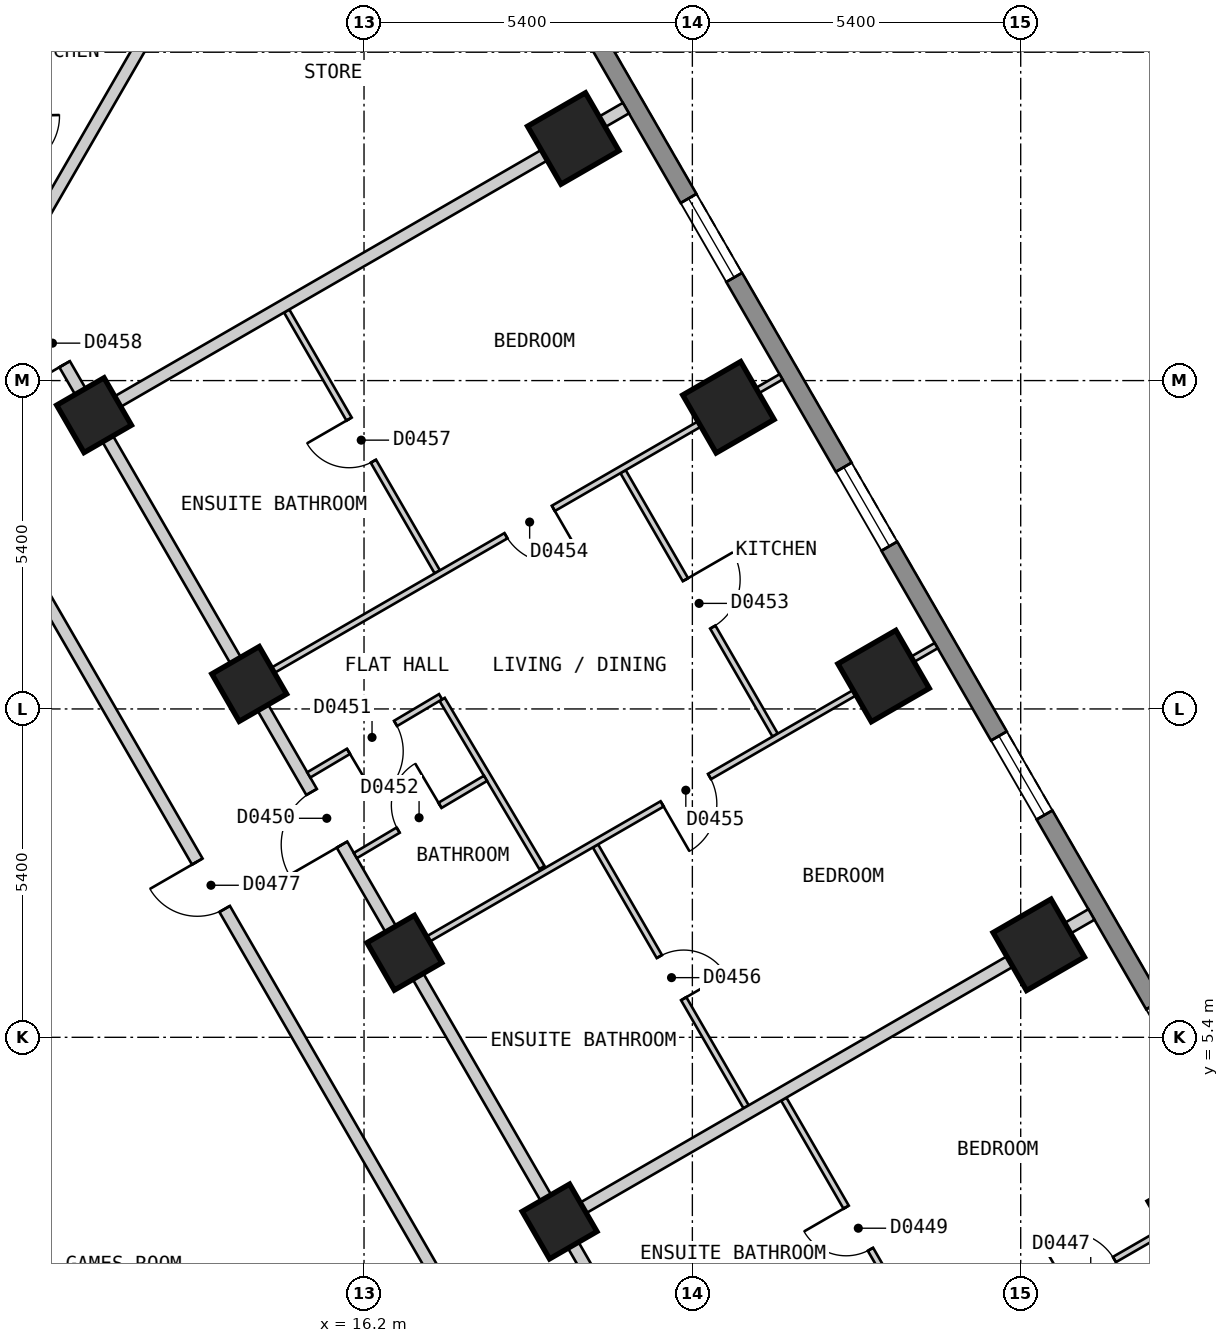
"""IFC4 building model, lengths in metres.
Left out: names, types, materials, properties, quantities, classifications, styles, units other than length and angle.
Written with IfcOpenShell. Run it as: python <this file> out.ifc"""

import sys

from ifc_helpers import new_model, si_unit, direction, frame, frame_2d, origin, origin_2d, place, context, subcontext, project, spatial, polyline, rectangle, outline, extrude, element, fill, save


model = new_model("IFC4")
c1 = context("Model", 3, precision=1e-05, world=origin(), true_north=direction((0.0, 1.0)))
c2 = subcontext(c1, "Body", "Model", "MODEL_VIEW")
j1 = project(units=[si_unit("LENGTHUNIT", "METRE"), si_unit("PLANEANGLEUNIT", "RADIAN")], contexts=[c1])
p1 = place(None, origin())
s1 = spatial("IfcSite", under=j1, at=p1, CompositionType="ELEMENT")
p2 = place(p1, origin())
s2 = spatial("IfcBuilding", under=s1, at=p2, CompositionType="ELEMENT")
p3 = place(p2, frame((0.0, 0.0, 26.4)))
s3 = spatial("IfcBuildingStorey", under=s2, at=p3, CompositionType="ELEMENT", Elevation=26.4)
for number, where, z_axis, x_axis in (
    (1, (29.848, 2.5, 0.0), (0.0, 0.0, 1.0), (-0.5, 0.866, 0.0)),
    (2, (27.297, 6.921, 0.0), (0.0, 0.0, 1.0), (-0.5, 0.866, 0.0)),
    (3, (24.745, 11.341, 0.0), (0.0, 0.0, 1.0), (-0.5, 0.866, 0.0)),
    (4, (22.193, 15.761, 0.0), (0.0, 0.0, 1.0), (-0.5, 0.866, 0.0)),
    (5, (19.641, 20.181, 0.0), (0.0, 0.0, 1.0), (-0.5, 0.866, 0.0)),
):
    element("IfcColumn", number, at=place(p3, frame(where, z_axis=z_axis, x_axis=x_axis)), inside=s3, PredefinedType="COLUMN", context=c2, shape_type="SweptSolid", body=[
        extrude(rectangle(XDim=1.1, YDim=1.1, at=origin_2d()), origin(), (0.0, 0.0, 1.0), 3.0),
    ])
for number, where, z_axis, x_axis in (
    (6, (19.416, 2.371, 0.0), (0.0, 0.0, 1.0), (-0.5, 0.866, 0.0)),
    (7, (16.864, 6.791, 0.0), (0.0, 0.0, 1.0), (-0.5, 0.866, 0.0)),
    (8, (14.312, 11.211, 0.0), (0.0, 0.0, 1.0), (-0.5, 0.866, 0.0)),
    (9, (11.76, 15.631, 0.0), (0.0, 0.0, 1.0), (-0.5, 0.866, 0.0)),
):
    element("IfcColumn", number, at=place(p3, frame(where, z_axis=z_axis, x_axis=x_axis)), inside=s3, PredefinedType="COLUMN", context=c2, shape_type="SweptSolid", body=[
        extrude(rectangle(XDim=0.9, YDim=0.9, at=origin_2d()), origin(), (0.0, 0.0, 1.0), 3.0),
    ])
p4 = place(p3, frame((31.22, 2.425, 0.0), z_axis=(0.0, 0.0, 1.0), x_axis=(-0.500001938803, 0.866024284413, 0.0)))
e10 = element("IfcWall", 10, at=p4, inside=s3, PredefinedType="SOLIDWALL", context=c2, shape_type="SweptSolid", body=[
    extrude(outline(polyline([(0.0, -0.15), (27.02, -0.15), (26.94, 0.15), (0.08, 0.15), (0.0, -0.15)])), origin(), (0.0, 0.0, 1.0), 2.7),
])
p5 = place(p4, frame((2.553, 0.0, 0.15)))
e11 = element("IfcOpeningElement", 11, at=p5, cuts=e10, PredefinedType="OPENING", context=c2, shape_type="SweptSolid", body=[
    extrude(rectangle(XDim=1.5, YDim=2.1, at=frame_2d((0.75, 1.05))), frame((0.0, 0.16, 0.0), z_axis=(0.0, -1.0, 0.0), x_axis=(1.0, 0.0, 0.0)), (0.0, 0.0, 1.0), 0.32),
])
p6 = place(p4, frame((7.657, 0.0, 0.15)))
e12 = element("IfcOpeningElement", 12, at=p6, cuts=e10, PredefinedType="OPENING", context=c2, shape_type="SweptSolid", body=[
    extrude(rectangle(XDim=1.5, YDim=2.1, at=frame_2d((0.75, 1.05))), frame((0.0, 0.16, 0.0), z_axis=(0.0, -1.0, 0.0), x_axis=(1.0, 0.0, 0.0)), (0.0, 0.0, 1.0), 0.32),
])
p7 = place(p4, frame((12.761, 0.0, 0.15)))
e13 = element("IfcOpeningElement", 13, at=p7, cuts=e10, PredefinedType="OPENING", context=c2, shape_type="SweptSolid", body=[
    extrude(rectangle(XDim=1.5, YDim=2.1, at=frame_2d((0.75, 1.05))), frame((0.0, 0.16, 0.0), z_axis=(0.0, -1.0, 0.0), x_axis=(1.0, 0.0, 0.0)), (0.0, 0.0, 1.0), 0.32),
])
p8 = place(p4, frame((17.865, 0.0, 0.15)))
e14 = element("IfcOpeningElement", 14, at=p8, cuts=e10, PredefinedType="OPENING", context=c2, shape_type="SweptSolid", body=[
    extrude(rectangle(XDim=1.5, YDim=2.1, at=frame_2d((0.75, 1.05))), frame((0.0, 0.16, 0.0), z_axis=(0.0, -1.0, 0.0), x_axis=(1.0, 0.0, 0.0)), (0.0, 0.0, 1.0), 0.32),
])
p9 = place(p4, frame((22.969, 0.0, 0.15)))
e15 = element("IfcOpeningElement", 15, at=p9, cuts=e10, PredefinedType="OPENING", context=c2, shape_type="SweptSolid", body=[
    extrude(rectangle(XDim=1.5, YDim=2.1, at=frame_2d((0.75, 1.05))), frame((0.0, 0.16, 0.0), z_axis=(0.0, -1.0, 0.0), x_axis=(1.0, 0.0, 0.0)), (0.0, 0.0, 1.0), 0.32),
])
p10 = place(p3, frame((9.18, 15.7, 0.0), z_axis=(0.0, 0.0, 1.0), x_axis=(0.500003652032, -0.866023295272, 0.0)))
e16 = element("IfcWall", 16, at=p10, inside=s3, PredefinedType="PARTITIONING", context=c2, shape_type="SweptSolid", body=[
    extrude(rectangle(XDim=18.012, YDim=0.2, at=frame_2d((9.006, 0.0))), origin(), (0.0, 0.0, 1.0), 2.7),
])
p11 = place(p10, frame((8.556, 0.0, 0.0)))
e17 = element("IfcOpeningElement", 17, at=p11, cuts=e16, PredefinedType="OPENING", context=c2, shape_type="SweptSolid", body=[
    extrude(rectangle(XDim=0.9, YDim=2.1, at=frame_2d((0.45, 1.05))), frame((0.0, 0.11, 0.0), z_axis=(0.0, -1.0, 0.0), x_axis=(1.0, 0.0, 0.0)), (0.0, 0.0, 1.0), 0.22),
])
p12 = place(p3, frame((10.45, 17.9, 0.0), z_axis=(0.0, 0.0, 1.0), x_axis=(0.500034352617, -0.866005569383, 0.0)))
e18 = element("IfcWall", 18, at=p12, inside=s3, PredefinedType="PARTITIONING", context=c2, shape_type="SweptSolid", body=[
    extrude(rectangle(XDim=20.553, YDim=0.2, at=frame_2d((10.276, 0.0))), origin(), (0.0, 0.0, 1.0), 2.7),
])
p13 = place(p12, frame((9.775, 0.0, 0.0)))
e19 = element("IfcOpeningElement", 19, at=p13, cuts=e18, PredefinedType="OPENING", context=c2, shape_type="SweptSolid", body=[
    extrude(rectangle(XDim=1.0, YDim=2.1, at=frame_2d((0.5, 1.05))), frame((0.0, 0.11, 0.0), z_axis=(0.0, -1.0, 0.0), x_axis=(1.0, 0.0, 0.0)), (0.0, 0.0, 1.0), 0.22),
])
p14 = place(p12, frame((0.852, 0.0, 0.0)))
e20 = element("IfcOpeningElement", 20, at=p14, cuts=e18, PredefinedType="OPENING", context=c2, shape_type="SweptSolid", body=[
    extrude(rectangle(XDim=0.8, YDim=2.1, at=frame_2d((0.4, 1.05))), frame((0.0, 0.11, 0.0), z_axis=(0.0, -1.0, 0.0), x_axis=(1.0, 0.0, 0.0)), (0.0, 0.0, 1.0), 0.22),
])
p15 = place(p3, frame((17.485, 10.957, 0.0), z_axis=(0.0, 0.0, 1.0), x_axis=(0.510324709283, -0.859981796956, 0.0)))
e21 = element("IfcWall", 21, at=p15, inside=s3, PredefinedType="PARTITIONING", context=c2, shape_type="SweptSolid", body=[
    extrude(rectangle(XDim=3.215, YDim=0.1, at=frame_2d((1.608, 0.0))), origin(), (0.0, 0.0, 1.0), 2.7),
])
p16 = place(p3, frame((14.928, 17.344, 0.0), z_axis=(0.0, 0.0, 1.0), x_axis=(0.500029609304, -0.86600830817, 0.0)))
e22 = element("IfcWall", 22, at=p16, inside=s3, PredefinedType="PARTITIONING", context=c2, shape_type="SweptSolid", body=[
    extrude(rectangle(XDim=4.954, YDim=0.1, at=frame_2d((2.477, 0.0))), origin(), (0.0, 0.0, 1.0), 2.7),
])
p17 = place(p16, frame((2.052, 0.0, 0.0)))
e23 = element("IfcOpeningElement", 23, at=p17, cuts=e22, PredefinedType="OPENING", context=c2, shape_type="SweptSolid", body=[
    extrude(rectangle(XDim=0.8, YDim=2.1, at=frame_2d((0.4, 1.05))), frame((0.0, 0.06, 0.0), z_axis=(0.0, -1.0, 0.0), x_axis=(1.0, 0.0, 0.0)), (0.0, 0.0, 1.0), 0.12),
])
p18 = place(p3, frame((20.006, 8.548, 0.0), z_axis=(0.0, 0.0, 1.0), x_axis=(0.500055121407, -0.865993577086, 0.0)))
e24 = element("IfcWall", 24, at=p18, inside=s3, PredefinedType="PARTITIONING", context=c2, shape_type="SweptSolid", body=[
    extrude(rectangle(XDim=4.955, YDim=0.1, at=frame_2d((2.478, 0.0))), origin(), (0.0, 0.0, 1.0), 2.7),
])
p19 = place(p18, frame((2.102, 0.0, 0.0)))
e25 = element("IfcOpeningElement", 25, at=p19, cuts=e24, PredefinedType="OPENING", context=c2, shape_type="SweptSolid", body=[
    extrude(rectangle(XDim=0.8, YDim=2.1, at=frame_2d((0.4, 1.05))), frame((0.0, 0.06, 0.0), z_axis=(0.0, -1.0, 0.0), x_axis=(1.0, 0.0, 0.0)), (0.0, 0.0, 1.0), 0.12),
])
p20 = place(p3, frame((23.103, 4.384, 0.0), z_axis=(0.0, 0.0, 1.0), x_axis=(0.500029609304, -0.86600830817, 0.0)))
e26 = element("IfcWall", 26, at=p20, inside=s3, PredefinedType="PARTITIONING", context=c2, shape_type="SweptSolid", body=[
    extrude(rectangle(XDim=4.954, YDim=0.1, at=frame_2d((2.477, 0.0))), origin(), (0.0, 0.0, 1.0), 2.7),
])
p21 = place(p20, frame((2.052, 0.0, 0.0)))
e27 = element("IfcOpeningElement", 27, at=p21, cuts=e26, PredefinedType="OPENING", context=c2, shape_type="SweptSolid", body=[
    extrude(rectangle(XDim=0.8, YDim=2.1, at=frame_2d((0.4, 1.05))), frame((0.0, 0.06, 0.0), z_axis=(0.0, -1.0, 0.0), x_axis=(1.0, 0.0, 0.0)), (0.0, 0.0, 1.0), 0.12),
])
p22 = place(p3, frame((20.46, 14.703, 0.0), z_axis=(0.0, 0.0, 1.0), x_axis=(0.499918186652, -0.866072633591, 0.0)))
e28 = element("IfcWall", 28, at=p22, inside=s3, PredefinedType="PARTITIONING", context=c2, shape_type="SweptSolid", body=[
    extrude(rectangle(XDim=5.003, YDim=0.1, at=frame_2d((2.501, 0.0))), origin(), (0.0, 0.0, 1.0), 2.7),
])
p23 = place(p22, frame((2.052, 0.0, 0.0)))
e29 = element("IfcOpeningElement", 29, at=p23, cuts=e28, PredefinedType="OPENING", context=c2, shape_type="SweptSolid", body=[
    extrude(rectangle(XDim=0.9, YDim=2.1, at=frame_2d((0.45, 1.05))), frame((0.0, 0.06, 0.0), z_axis=(0.0, -1.0, 0.0), x_axis=(1.0, 0.0, 0.0)), (0.0, 0.0, 1.0), 0.12),
])
p24 = place(p3, frame((25.588, 0.041, 0.0), z_axis=(0.0, 0.0, 1.0), x_axis=(0.866113484451, 0.499847408768, 0.0)))
e30 = element("IfcWall", 30, at=p24, inside=s3, PredefinedType="PARTITIONING", context=c2, shape_type="SweptSolid", body=[
    extrude(rectangle(XDim=5.92, YDim=0.1, at=frame_2d((2.96, 0.0))), origin(), (0.0, 0.0, 1.0), 2.7),
])
p25 = place(p24, frame((2.51, 0.0, 0.0)))
e31 = element("IfcOpeningElement", 31, at=p25, cuts=e30, PredefinedType="OPENING", context=c2, shape_type="SweptSolid", body=[
    extrude(rectangle(XDim=0.9, YDim=2.1, at=frame_2d((0.45, 1.05))), frame((0.0, 0.06, 0.0), z_axis=(0.0, -1.0, 0.0), x_axis=(1.0, 0.0, 0.0)), (0.0, 0.0, 1.0), 0.12),
])
p26 = place(p3, frame((16.95, 6.841, 0.0), z_axis=(0.0, 0.0, 1.0), x_axis=(0.866022959057, 0.500004234368, 0.0)))
e32 = element("IfcWall", 32, at=p26, inside=s3, PredefinedType="PARTITIONING", context=c2, shape_type="SweptSolid", body=[
    extrude(rectangle(XDim=10.0, YDim=0.1, at=frame_2d((5.0, 0.0))), origin(), (0.0, 0.0, 1.0), 2.7),
])
p27 = place(p26, frame((4.795, 0.0, 0.0)))
e33 = element("IfcOpeningElement", 33, at=p27, cuts=e32, PredefinedType="OPENING", context=c2, shape_type="SweptSolid", body=[
    extrude(rectangle(XDim=0.9, YDim=2.1, at=frame_2d((0.45, 1.05))), frame((0.0, 0.06, 0.0), z_axis=(0.0, -1.0, 0.0), x_axis=(1.0, 0.0, 0.0)), (0.0, 0.0, 1.0), 0.12),
])
p28 = place(p3, frame((14.399, 11.261, 0.0), z_axis=(0.0, 0.0, 1.0), x_axis=(0.866022959057, 0.500004234368, 0.0)))
e34 = element("IfcWall", 34, at=p28, inside=s3, PredefinedType="PARTITIONING", context=c2, shape_type="SweptSolid", body=[
    extrude(rectangle(XDim=10.0, YDim=0.1, at=frame_2d((5.0, 0.0))), origin(), (0.0, 0.0, 1.0), 2.7),
])
p29 = place(p28, frame((4.775, 0.0, 0.0)))
e35 = element("IfcOpeningElement", 35, at=p29, cuts=e34, PredefinedType="OPENING", context=c2, shape_type="SweptSolid", body=[
    extrude(rectangle(XDim=0.9, YDim=2.1, at=frame_2d((0.45, 1.05))), frame((0.0, 0.06, 0.0), z_axis=(0.0, -1.0, 0.0), x_axis=(1.0, 0.0, 0.0)), (0.0, 0.0, 1.0), 0.12),
])
p30 = place(p3, frame((16.057, 8.389, 0.0), z_axis=(0.0, 0.0, 1.0), x_axis=(0.860077993161, 0.510162567893, 0.0)))
e36 = element("IfcWall", 36, at=p30, inside=s3, PredefinedType="PARTITIONING", context=c2, shape_type="SweptSolid", body=[
    extrude(rectangle(XDim=2.49, YDim=0.1, at=frame_2d((1.245, 0.0))), origin(), (0.0, 0.0, 1.0), 2.7),
])
p31 = place(p30, frame((0.819, 0.0, 0.0)))
e37 = element("IfcOpeningElement", 37, at=p31, cuts=e36, PredefinedType="OPENING", context=c2, shape_type="SweptSolid", body=[
    extrude(rectangle(XDim=0.8, YDim=2.1, at=frame_2d((0.4, 1.05))), frame((0.0, 0.06, 0.0), z_axis=(0.0, -1.0, 0.0), x_axis=(1.0, 0.0, 0.0)), (0.0, 0.0, 1.0), 0.12),
])
p32 = place(p3, frame((15.291, 9.715, 0.0), z_axis=(0.0, 0.0, 1.0), x_axis=(0.860088508644, 0.51014483953, 0.0)))
e38 = element("IfcWall", 38, at=p32, inside=s3, PredefinedType="PARTITIONING", context=c2, shape_type="SweptSolid", body=[
    extrude(rectangle(XDim=2.521, YDim=0.1, at=frame_2d((1.26, 0.0))), origin(), (0.0, 0.0, 1.0), 2.7),
])
p33 = place(p32, frame((0.76, 0.0, 0.0)))
e39 = element("IfcOpeningElement", 39, at=p33, cuts=e38, PredefinedType="OPENING", context=c2, shape_type="SweptSolid", body=[
    extrude(rectangle(XDim=0.9, YDim=2.1, at=frame_2d((0.45, 1.05))), frame((0.0, 0.06, 0.0), z_axis=(0.0, -1.0, 0.0), x_axis=(1.0, 0.0, 0.0)), (0.0, 0.0, 1.0), 0.12),
])
p34 = place(p3, frame((10.393, 18.0, 0.0), z_axis=(0.0, 0.0, 1.0), x_axis=(0.499945497007, 0.866056868816, 0.0)))
e40 = element("IfcWall", 40, at=p34, inside=s3, PredefinedType="PARTITIONING", context=c2, shape_type="SweptSolid", body=[
    extrude(rectangle(XDim=10.265, YDim=0.2, at=frame_2d((5.132, 0.0))), origin(), (0.0, 0.0, 1.0), 2.7),
])
p35 = place(p3, frame((19.503, 2.421, 0.0), z_axis=(0.0, 0.0, 1.0), x_axis=(0.866065245018, 0.499930986609, 0.0)))
e41 = element("IfcWall", 41, at=p35, inside=s3, PredefinedType="PARTITIONING", context=c2, shape_type="SweptSolid", body=[
    extrude(rectangle(XDim=10.0, YDim=0.2, at=frame_2d((5.0, 0.0))), origin(), (0.0, 0.0, 1.0), 2.7),
])
p36 = place(p3, frame((11.847, 15.681, 0.0), z_axis=(0.0, 0.0, 1.0), x_axis=(0.866022959057, 0.500004234368, 0.0)))
e42 = element("IfcWall", 42, at=p36, inside=s3, PredefinedType="PARTITIONING", context=c2, shape_type="SweptSolid", body=[
    extrude(rectangle(XDim=10.0, YDim=0.2, at=frame_2d((5.0, 0.0))), origin(), (0.0, 0.0, 1.0), 2.7),
])
p37 = place(p6, origin())
e43 = element("IfcWindow", 43, at=p37, inside=s3, PartitioningType="SINGLE_PANEL", PredefinedType="WINDOW", context=c2, shape_type="SweptSolid", body=[
    extrude(rectangle(XDim=1.5, YDim=2.1, at=frame_2d((0.75, 1.05))), frame((0.0, 0.03, 0.0), z_axis=(0.0, -1.0, 0.0), x_axis=(1.0, 0.0, 0.0)), (0.0, 0.0, 1.0), 0.06),
])
fill(e12, e43)
p38 = place(p7, origin())
e44 = element("IfcWindow", 44, at=p38, inside=s3, PartitioningType="SINGLE_PANEL", PredefinedType="WINDOW", context=c2, shape_type="SweptSolid", body=[
    extrude(rectangle(XDim=1.5, YDim=2.1, at=frame_2d((0.75, 1.05))), frame((0.0, 0.03, 0.0), z_axis=(0.0, -1.0, 0.0), x_axis=(1.0, 0.0, 0.0)), (0.0, 0.0, 1.0), 0.06),
])
fill(e13, e44)
p39 = place(p8, origin())
e45 = element("IfcWindow", 45, at=p39, inside=s3, PartitioningType="SINGLE_PANEL", PredefinedType="WINDOW", context=c2, shape_type="SweptSolid", body=[
    extrude(rectangle(XDim=1.5, YDim=2.1, at=frame_2d((0.75, 1.05))), frame((0.0, 0.03, 0.0), z_axis=(0.0, -1.0, 0.0), x_axis=(1.0, 0.0, 0.0)), (0.0, 0.0, 1.0), 0.06),
])
fill(e14, e45)
p40 = place(p25, origin())
e46 = element("IfcDoor", 46, at=p40, inside=s3, OperationType="SINGLE_SWING_LEFT", PredefinedType="DOOR", context=c2, shape_type="SweptSolid", body=[
    extrude(rectangle(XDim=0.9, YDim=2.1, at=frame_2d((0.45, 1.05))), frame((0.0, 0.025, 0.0), z_axis=(0.0, -1.0, 0.0), x_axis=(1.0, 0.0, 0.0)), (0.0, 0.0, 1.0), 0.05),
])
fill(e31, e46)
p41 = place(p21, origin())
e47 = element("IfcDoor", 47, at=p41, inside=s3, OperationType="SINGLE_SWING_LEFT", PredefinedType="DOOR", context=c2, shape_type="SweptSolid", body=[
    extrude(rectangle(XDim=0.8, YDim=2.1, at=frame_2d((0.4, 1.05))), frame((0.0, 0.025, 0.0), z_axis=(0.0, -1.0, 0.0), x_axis=(1.0, 0.0, 0.0)), (0.0, 0.0, 1.0), 0.05),
])
fill(e27, e47)
p42 = place(p13, origin())
e48 = element("IfcDoor", 48, at=p42, inside=s3, OperationType="SINGLE_SWING_RIGHT", PredefinedType="DOOR", context=c2, shape_type="SweptSolid", body=[
    extrude(rectangle(XDim=1.0, YDim=2.1, at=frame_2d((0.5, 1.05))), frame((0.0, 0.025, 0.0), z_axis=(0.0, -1.0, 0.0), x_axis=(1.0, 0.0, 0.0)), (0.0, 0.0, 1.0), 0.05),
])
fill(e19, e48)
p43 = place(p33, origin())
e49 = element("IfcDoor", 49, at=p43, inside=s3, OperationType="SINGLE_SWING_LEFT", PredefinedType="DOOR", context=c2, shape_type="SweptSolid", body=[
    extrude(rectangle(XDim=0.9, YDim=2.1, at=frame_2d((0.45, 1.05))), frame((0.0, 0.025, 0.0), z_axis=(0.0, -1.0, 0.0), x_axis=(1.0, 0.0, 0.0)), (0.0, 0.0, 1.0), 0.05),
])
fill(e39, e49)
p44 = place(p31, origin())
e50 = element("IfcDoor", 50, at=p44, inside=s3, OperationType="SINGLE_SWING_RIGHT", PredefinedType="DOOR", context=c2, shape_type="SweptSolid", body=[
    extrude(rectangle(XDim=0.8, YDim=2.1, at=frame_2d((0.4, 1.05))), frame((0.0, 0.025, 0.0), z_axis=(0.0, -1.0, 0.0), x_axis=(1.0, 0.0, 0.0)), (0.0, 0.0, 1.0), 0.05),
])
fill(e37, e50)
p45 = place(p23, origin())
e51 = element("IfcDoor", 51, at=p45, inside=s3, OperationType="SINGLE_SWING_LEFT", PredefinedType="DOOR", context=c2, shape_type="SweptSolid", body=[
    extrude(rectangle(XDim=0.9, YDim=2.1, at=frame_2d((0.45, 1.05))), frame((0.0, 0.025, 0.0), z_axis=(0.0, -1.0, 0.0), x_axis=(1.0, 0.0, 0.0)), (0.0, 0.0, 1.0), 0.05),
])
fill(e29, e51)
p46 = place(p29, origin())
e52 = element("IfcDoor", 52, at=p46, inside=s3, OperationType="SINGLE_SWING_RIGHT", PredefinedType="DOOR", context=c2, shape_type="SweptSolid", body=[
    extrude(rectangle(XDim=0.9, YDim=2.1, at=frame_2d((0.45, 1.05))), frame((0.0, 0.025, 0.0), z_axis=(0.0, -1.0, 0.0), x_axis=(1.0, 0.0, 0.0)), (0.0, 0.0, 1.0), 0.05),
])
fill(e35, e52)
p47 = place(p27, origin())
e53 = element("IfcDoor", 53, at=p47, inside=s3, OperationType="SINGLE_SWING_LEFT", PredefinedType="DOOR", context=c2, shape_type="SweptSolid", body=[
    extrude(rectangle(XDim=0.9, YDim=2.1, at=frame_2d((0.45, 1.05))), frame((0.0, 0.025, 0.0), z_axis=(0.0, -1.0, 0.0), x_axis=(1.0, 0.0, 0.0)), (0.0, 0.0, 1.0), 0.05),
])
fill(e33, e53)
p48 = place(p19, origin())
e54 = element("IfcDoor", 54, at=p48, inside=s3, OperationType="SINGLE_SWING_RIGHT", PredefinedType="DOOR", context=c2, shape_type="SweptSolid", body=[
    extrude(rectangle(XDim=0.8, YDim=2.1, at=frame_2d((0.4, 1.05))), frame((0.0, 0.025, 0.0), z_axis=(0.0, -1.0, 0.0), x_axis=(1.0, 0.0, 0.0)), (0.0, 0.0, 1.0), 0.05),
])
fill(e25, e54)
p49 = place(p17, origin())
e55 = element("IfcDoor", 55, at=p49, inside=s3, OperationType="SINGLE_SWING_LEFT", PredefinedType="DOOR", context=c2, shape_type="SweptSolid", body=[
    extrude(rectangle(XDim=0.8, YDim=2.1, at=frame_2d((0.4, 1.05))), frame((0.0, 0.025, 0.0), z_axis=(0.0, -1.0, 0.0), x_axis=(1.0, 0.0, 0.0)), (0.0, 0.0, 1.0), 0.05),
])
fill(e23, e55)
p50 = place(p14, origin())
e56 = element("IfcDoor", 56, at=p50, inside=s3, OperationType="SINGLE_SWING_RIGHT", PredefinedType="DOOR", context=c2, shape_type="SweptSolid", body=[
    extrude(rectangle(XDim=0.8, YDim=2.1, at=frame_2d((0.4, 1.05))), frame((0.0, 0.025, 0.0), z_axis=(0.0, -1.0, 0.0), x_axis=(1.0, 0.0, 0.0)), (0.0, 0.0, 1.0), 0.05),
])
fill(e20, e56)
p51 = place(p11, origin())
e57 = element("IfcDoor", 57, at=p51, inside=s3, OperationType="SINGLE_SWING_LEFT", PredefinedType="DOOR", context=c2, shape_type="SweptSolid", body=[
    extrude(rectangle(XDim=0.9, YDim=2.1, at=frame_2d((0.45, 1.05))), frame((0.0, 0.025, 0.0), z_axis=(0.0, -1.0, 0.0), x_axis=(1.0, 0.0, 0.0)), (0.0, 0.0, 1.0), 0.05),
])
fill(e17, e57)
save(model, sys.argv[1])
